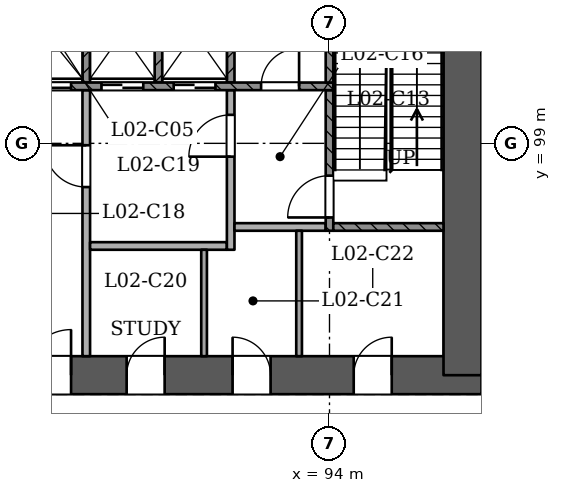
"""IFC4 building model, lengths in metres.
Left out: names, types, materials, properties, quantities, classifications, styles, units other than length and angle.
Written with IfcOpenShell. Run it as: python <this file> out.ifc"""

import sys

from ifc_helpers import new_model, si_unit, direction, frame, frame_2d, origin, place, context, subcontext, project, spatial, rectangle, extrude, element, fill, save


model = new_model("IFC4")
c1 = context("Model", 3, precision=1e-05, world=origin(), true_north=direction((0.0, 1.0)))
c2 = subcontext(c1, "Body", "Model", "MODEL_VIEW")
j1 = project(units=[si_unit("LENGTHUNIT", "METRE"), si_unit("PLANEANGLEUNIT", "RADIAN")], contexts=[c1])
p1 = place(None, origin())
s1 = spatial("IfcSite", under=j1, at=p1, CompositionType="ELEMENT")
p2 = place(p1, origin())
s2 = spatial("IfcBuilding", under=s1, at=p2, CompositionType="ELEMENT")
p3 = place(p2, frame((0.0, 0.0, 13.5)))
s3 = spatial("IfcBuildingStorey", under=s2, at=p3, CompositionType="ELEMENT", Elevation=13.5)
p4 = place(p3, frame((72.5, 92.9, 0.0), z_axis=(0.0, 0.0, 1.0), x_axis=(1.0, 0.0, 0.0)))
e1 = element("IfcWall", 1, at=p4, inside=s3, PredefinedType="SHEAR", context=c2, shape_type="SweptSolid", body=[
    extrude(rectangle(XDim=25.5, YDim=1.0, at=frame_2d((12.75, 0.0))), origin(), (0.0, 0.0, 1.0), 4.5),
])
p5 = place(p4, frame((1.3, 0.0, 0.0)))
e2 = element("IfcOpeningElement", 2, at=p5, cuts=e1, PredefinedType="OPENING", context=c2, shape_type="SweptSolid", body=[
    extrude(rectangle(XDim=1.2, YDim=2.1, at=frame_2d((0.6, 1.05))), frame((0.0, 0.51, 0.0), z_axis=(0.0, -1.0, 0.0), x_axis=(1.0, 0.0, 0.0)), (0.0, 0.0, 1.0), 1.021),
])
p6 = place(p4, frame((3.5, 0.0, 0.0)))
e3 = element("IfcOpeningElement", 3, at=p6, cuts=e1, PredefinedType="OPENING", context=c2, shape_type="SweptSolid", body=[
    extrude(rectangle(XDim=1.2, YDim=2.1, at=frame_2d((0.6, 1.05))), frame((0.0, 0.51, 0.0), z_axis=(0.0, -1.0, 0.0), x_axis=(1.0, 0.0, 0.0)), (0.0, 0.0, 1.0), 1.021),
])
p7 = place(p4, frame((13.5, 0.0, 0.0)))
e4 = element("IfcOpeningElement", 4, at=p7, cuts=e1, PredefinedType="OPENING", context=c2, shape_type="SweptSolid", body=[
    extrude(rectangle(XDim=1.2, YDim=2.1, at=frame_2d((0.6, 1.05))), frame((0.0, 0.51, 0.0), z_axis=(0.0, -1.0, 0.0), x_axis=(1.0, 0.0, 0.0)), (0.0, 0.0, 1.0), 1.021),
])
p8 = place(p4, frame((16.163, 0.0, 0.0)))
e5 = element("IfcOpeningElement", 5, at=p8, cuts=e1, PredefinedType="OPENING", context=c2, shape_type="SweptSolid", body=[
    extrude(rectangle(XDim=1.0, YDim=2.1, at=frame_2d((0.5, 1.05))), frame((0.0, 0.51, 0.0), z_axis=(0.0, -1.0, 0.0), x_axis=(1.0, 0.0, 0.0)), (0.0, 0.0, 1.0), 1.021),
])
p9 = place(p4, frame((18.95, 0.0, 0.0)))
e6 = element("IfcOpeningElement", 6, at=p9, cuts=e1, PredefinedType="OPENING", context=c2, shape_type="SweptSolid", body=[
    extrude(rectangle(XDim=1.0, YDim=2.1, at=frame_2d((0.5, 1.05))), frame((0.0, 0.51, 0.0), z_axis=(0.0, -1.0, 0.0), x_axis=(1.0, 0.0, 0.0)), (0.0, 0.0, 1.0), 1.021),
])
p10 = place(p4, frame((22.137, 0.0, 0.0)))
e7 = element("IfcOpeningElement", 7, at=p10, cuts=e1, PredefinedType="OPENING", context=c2, shape_type="SweptSolid", body=[
    extrude(rectangle(XDim=1.0, YDim=2.1, at=frame_2d((0.5, 1.05))), frame((0.0, 0.51, 0.0), z_axis=(0.0, -1.0, 0.0), x_axis=(1.0, 0.0, 0.0)), (0.0, 0.0, 1.0), 1.021),
])
p11 = place(p3, frame((97.5, 92.9, 0.0), z_axis=(0.0, 0.0, 1.0), x_axis=(0.0, 1.0, 0.0)))
e8 = element("IfcWall", 8, at=p11, inside=s3, PredefinedType="SHEAR", context=c2, shape_type="SweptSolid", body=[
    extrude(rectangle(XDim=11.5, YDim=1.0, at=frame_2d((5.75, 0.0))), origin(), (0.0, 0.0, 1.0), 4.5),
])
p12 = place(p3, frame((86.747, 47.526, 0.0), z_axis=(0.0, 0.0, 1.0), x_axis=(0.500000085768, 0.866025354266, 0.0)))
e9 = element("IfcWall", 9, at=p12, inside=s3, PredefinedType="PARTITIONING", context=c2, shape_type="SweptSolid", body=[
    extrude(rectangle(XDim=55.365, YDim=0.15, at=frame_2d((27.682, 0.0))), origin(), (0.0, 0.0, 1.0), 4.05),
])
p13 = place(p12, frame((0.97, 0.0, 0.0)))
e10 = element("IfcOpeningElement", 10, at=p13, cuts=e9, PredefinedType="OPENING", context=c2, shape_type="SweptSolid", body=[
    extrude(rectangle(XDim=1.2, YDim=2.1, at=frame_2d((0.6, 1.05))), frame((0.0, 0.085, 0.0), z_axis=(0.0, -1.0, 0.0), x_axis=(1.0, 0.0, 0.0)), (0.0, 0.0, 1.0), 0.171),
])
p14 = place(p12, frame((11.332, 0.0, 0.0)))
e11 = element("IfcOpeningElement", 11, at=p14, cuts=e9, PredefinedType="OPENING", context=c2, shape_type="SweptSolid", body=[
    extrude(rectangle(XDim=1.2, YDim=2.1, at=frame_2d((0.6, 1.05))), frame((0.0, 0.085, 0.0), z_axis=(0.0, -1.0, 0.0), x_axis=(1.0, 0.0, 0.0)), (0.0, 0.0, 1.0), 0.171),
])
p15 = place(p12, frame((29.332, 0.0, 0.0)))
e12 = element("IfcOpeningElement", 12, at=p15, cuts=e9, PredefinedType="OPENING", context=c2, shape_type="SweptSolid", body=[
    extrude(rectangle(XDim=1.2, YDim=2.1, at=frame_2d((0.6, 1.05))), frame((0.0, 0.085, 0.0), z_axis=(0.0, -1.0, 0.0), x_axis=(1.0, 0.0, 0.0)), (0.0, 0.0, 1.0), 0.171),
])
p16 = place(p12, frame((42.132, 0.0, 0.0)))
e13 = element("IfcOpeningElement", 13, at=p16, cuts=e9, PredefinedType="OPENING", context=c2, shape_type="SweptSolid", body=[
    extrude(rectangle(XDim=1.2, YDim=2.1, at=frame_2d((0.6, 1.05))), frame((0.0, 0.085, 0.0), z_axis=(0.0, -1.0, 0.0), x_axis=(1.0, 0.0, 0.0)), (0.0, 0.0, 1.0), 0.171),
])
p17 = place(p12, frame((46.569, 0.0, 0.0)))
e14 = element("IfcOpeningElement", 14, at=p17, cuts=e9, PredefinedType="OPENING", context=c2, shape_type="SweptSolid", body=[
    extrude(rectangle(XDim=1.0, YDim=2.1, at=frame_2d((0.5, 1.05))), frame((0.0, 0.085, 0.0), z_axis=(0.0, -1.0, 0.0), x_axis=(1.0, 0.0, 0.0)), (0.0, 0.0, 1.0), 0.171),
])
p18 = place(p12, frame((48.819, 0.0, 0.0)))
e15 = element("IfcOpeningElement", 15, at=p18, cuts=e9, PredefinedType="OPENING", context=c2, shape_type="SweptSolid", body=[
    extrude(rectangle(XDim=1.0, YDim=2.1, at=frame_2d((0.5, 1.05))), frame((0.0, 0.085, 0.0), z_axis=(0.0, -1.0, 0.0), x_axis=(1.0, 0.0, 0.0)), (0.0, 0.0, 1.0), 0.171),
])
p19 = place(p12, frame((51.837, 0.0, 0.0)))
e16 = element("IfcOpeningElement", 16, at=p19, cuts=e9, PredefinedType="OPENING", context=c2, shape_type="SweptSolid", body=[
    extrude(rectangle(XDim=1.2, YDim=2.1, at=frame_2d((0.6, 1.05))), frame((0.0, 0.085, 0.0), z_axis=(0.0, -1.0, 0.0), x_axis=(1.0, 0.0, 0.0)), (0.0, 0.0, 1.0), 0.171),
])
p20 = place(p3, frame((121.762, 95.574, 0.0), z_axis=(0.0, 0.0, 1.0), x_axis=(-0.499997306052, -0.866026959131, 0.0)))
e17 = element("IfcWall", 17, at=p20, inside=s3, PredefinedType="SOLIDWALL", context=c2, shape_type="SweptSolid", body=[
    extrude(rectangle(XDim=62.87, YDim=0.4, at=frame_2d((31.435, 0.0))), origin(), (0.0, 0.0, 1.0), 4.05),
])
p21 = place(p20, frame((59.452, 0.0, 0.9)))
e18 = element("IfcOpeningElement", 18, at=p21, cuts=e17, PredefinedType="OPENING", context=c2, shape_type="SweptSolid", body=[
    extrude(rectangle(XDim=2.4, YDim=1.5, at=frame_2d((1.2, 0.75))), frame((0.0, 0.21, 0.0), z_axis=(0.0, -1.0, 0.0), x_axis=(1.0, 0.0, 0.0)), (0.0, 0.0, 1.0), 0.421),
])
p22 = place(p20, frame((54.986, 0.0, 0.9)))
e19 = element("IfcOpeningElement", 19, at=p22, cuts=e17, PredefinedType="OPENING", context=c2, shape_type="SweptSolid", body=[
    extrude(rectangle(XDim=2.4, YDim=1.5, at=frame_2d((1.2, 0.75))), frame((0.0, 0.21, 0.0), z_axis=(0.0, -1.0, 0.0), x_axis=(1.0, 0.0, 0.0)), (0.0, 0.0, 1.0), 0.421),
])
p23 = place(p20, frame((50.486, 0.0, 0.9)))
e20 = element("IfcOpeningElement", 20, at=p23, cuts=e17, PredefinedType="OPENING", context=c2, shape_type="SweptSolid", body=[
    extrude(rectangle(XDim=2.4, YDim=1.5, at=frame_2d((1.2, 0.75))), frame((0.0, 0.21, 0.0), z_axis=(0.0, -1.0, 0.0), x_axis=(1.0, 0.0, 0.0)), (0.0, 0.0, 1.0), 0.421),
])
p24 = place(p20, frame((45.986, 0.0, 0.9)))
e21 = element("IfcOpeningElement", 21, at=p24, cuts=e17, PredefinedType="OPENING", context=c2, shape_type="SweptSolid", body=[
    extrude(rectangle(XDim=2.4, YDim=1.5, at=frame_2d((1.2, 0.75))), frame((0.0, 0.21, 0.0), z_axis=(0.0, -1.0, 0.0), x_axis=(1.0, 0.0, 0.0)), (0.0, 0.0, 1.0), 0.421),
])
p25 = place(p20, frame((41.486, 0.0, 0.9)))
e22 = element("IfcOpeningElement", 22, at=p25, cuts=e17, PredefinedType="OPENING", context=c2, shape_type="SweptSolid", body=[
    extrude(rectangle(XDim=2.4, YDim=1.5, at=frame_2d((1.2, 0.75))), frame((0.0, 0.21, 0.0), z_axis=(0.0, -1.0, 0.0), x_axis=(1.0, 0.0, 0.0)), (0.0, 0.0, 1.0), 0.421),
])
p26 = place(p20, frame((36.986, 0.0, 0.9)))
e23 = element("IfcOpeningElement", 23, at=p26, cuts=e17, PredefinedType="OPENING", context=c2, shape_type="SweptSolid", body=[
    extrude(rectangle(XDim=2.4, YDim=1.5, at=frame_2d((1.2, 0.75))), frame((0.0, 0.21, 0.0), z_axis=(0.0, -1.0, 0.0), x_axis=(1.0, 0.0, 0.0)), (0.0, 0.0, 1.0), 0.421),
])
p27 = place(p20, frame((23.486, 0.0, 0.9)))
e24 = element("IfcOpeningElement", 24, at=p27, cuts=e17, PredefinedType="OPENING", context=c2, shape_type="SweptSolid", body=[
    extrude(rectangle(XDim=2.4, YDim=1.5, at=frame_2d((1.2, 0.75))), frame((0.0, 0.21, 0.0), z_axis=(0.0, -1.0, 0.0), x_axis=(1.0, 0.0, 0.0)), (0.0, 0.0, 1.0), 0.421),
])
p28 = place(p20, frame((18.986, 0.0, 0.9)))
e25 = element("IfcOpeningElement", 25, at=p28, cuts=e17, PredefinedType="OPENING", context=c2, shape_type="SweptSolid", body=[
    extrude(rectangle(XDim=2.4, YDim=1.5, at=frame_2d((1.2, 0.75))), frame((0.0, 0.21, 0.0), z_axis=(0.0, -1.0, 0.0), x_axis=(1.0, 0.0, 0.0)), (0.0, 0.0, 1.0), 0.421),
])
p29 = place(p20, frame((14.486, 0.0, 0.9)))
e26 = element("IfcOpeningElement", 26, at=p29, cuts=e17, PredefinedType="OPENING", context=c2, shape_type="SweptSolid", body=[
    extrude(rectangle(XDim=2.4, YDim=1.5, at=frame_2d((1.2, 0.75))), frame((0.0, 0.21, 0.0), z_axis=(0.0, -1.0, 0.0), x_axis=(1.0, 0.0, 0.0)), (0.0, 0.0, 1.0), 0.421),
])
p30 = place(p20, frame((5.486, 0.0, 0.9)))
e27 = element("IfcOpeningElement", 27, at=p30, cuts=e17, PredefinedType="OPENING", context=c2, shape_type="SweptSolid", body=[
    extrude(rectangle(XDim=2.4, YDim=1.5, at=frame_2d((1.2, 0.75))), frame((0.0, 0.21, 0.0), z_axis=(0.0, -1.0, 0.0), x_axis=(1.0, 0.0, 0.0)), (0.0, 0.0, 1.0), 0.421),
])
p31 = place(p20, frame((1.018, 0.0, 0.9)))
e28 = element("IfcOpeningElement", 28, at=p31, cuts=e17, PredefinedType="OPENING", context=c2, shape_type="SweptSolid", body=[
    extrude(rectangle(XDim=2.4, YDim=1.5, at=frame_2d((1.2, 0.75))), frame((0.0, 0.21, 0.0), z_axis=(0.0, -1.0, 0.0), x_axis=(1.0, 0.0, 0.0)), (0.0, 0.0, 1.0), 0.421),
])
p32 = place(p3, frame((87.6, 93.4, 0.0), z_axis=(0.0, 0.0, 1.0), x_axis=(0.0, 1.0, 0.0)))
e29 = element("IfcWall", 29, at=p32, inside=s3, PredefinedType="PARTITIONING", context=c2, shape_type="SweptSolid", body=[
    extrude(rectangle(XDim=7.0, YDim=0.2, at=frame_2d((3.5, 0.0))), origin(), (0.0, 0.0, 1.0), 4.05),
])
p33 = place(p32, frame((4.45, 0.0, 0.0)))
e30 = element("IfcOpeningElement", 30, at=p33, cuts=e29, PredefinedType="OPENING", context=c2, shape_type="SweptSolid", body=[
    extrude(rectangle(XDim=1.1, YDim=2.1, at=frame_2d((0.55, 1.05))), frame((0.0, 0.11, 0.0), z_axis=(0.0, -1.0, 0.0), x_axis=(1.0, 0.0, 0.0)), (0.0, 0.0, 1.0), 0.221),
])
p34 = place(p3, frame((90.7, 93.4, 0.0), z_axis=(0.0, 0.0, 1.0), x_axis=(0.0, 1.0, 0.0)))
e31 = element("IfcWall", 31, at=p34, inside=s3, PredefinedType="PARTITIONING", context=c2, shape_type="SweptSolid", body=[
    extrude(rectangle(XDim=2.8, YDim=0.15, at=frame_2d((1.4, 0.0))), origin(), (0.0, 0.0, 1.0), 4.05),
])
p35 = place(p3, frame((93.2, 93.4, 0.0), z_axis=(0.0, 0.0, 1.0), x_axis=(0.0, 1.0, 0.0)))
e32 = element("IfcWall", 32, at=p35, inside=s3, PredefinedType="PARTITIONING", context=c2, shape_type="SweptSolid", body=[
    extrude(rectangle(XDim=3.3, YDim=0.15, at=frame_2d((1.65, 0.0))), origin(), (0.0, 0.0, 1.0), 4.05),
])
p36 = place(p3, frame((87.7, 96.3, 0.0), z_axis=(0.0, 0.0, 1.0), x_axis=(1.0, 0.0, 0.0)))
e33 = element("IfcWall", 33, at=p36, inside=s3, PredefinedType="PARTITIONING", context=c2, shape_type="SweptSolid", body=[
    extrude(rectangle(XDim=3.6, YDim=0.2, at=frame_2d((1.8, 0.0))), origin(), (0.0, 0.0, 1.0), 4.05),
])
p37 = place(p3, frame((91.4, 96.2, 0.0), z_axis=(0.0, 0.0, 1.0), x_axis=(0.0, 1.0, 0.0)))
e34 = element("IfcWall", 34, at=p37, inside=s3, PredefinedType="PARTITIONING", context=c2, shape_type="SweptSolid", body=[
    extrude(rectangle(XDim=4.2, YDim=0.2, at=frame_2d((2.1, 0.0))), origin(), (0.0, 0.0, 1.0), 4.05),
])
p38 = place(p37, frame((2.45, 0.0, 0.0)))
e35 = element("IfcOpeningElement", 35, at=p38, cuts=e34, PredefinedType="OPENING", context=c2, shape_type="SweptSolid", body=[
    extrude(rectangle(XDim=1.1, YDim=2.1, at=frame_2d((0.55, 1.05))), frame((0.0, 0.11, 0.0), z_axis=(0.0, -1.0, 0.0), x_axis=(1.0, 0.0, 0.0)), (0.0, 0.0, 1.0), 0.221),
])
p39 = place(p3, frame((91.5, 96.8, 0.0), z_axis=(0.0, 0.0, 1.0), x_axis=(1.0, 0.0, 0.0)))
e36 = element("IfcWall", 36, at=p39, inside=s3, PredefinedType="PARTITIONING", context=c2, shape_type="SweptSolid", body=[
    extrude(rectangle(XDim=2.4, YDim=0.2, at=frame_2d((1.2, 0.0))), origin(), (0.0, 0.0, 1.0), 4.05),
])
p40 = place(p3, frame((94.0, 96.7, 0.0), z_axis=(0.0, 0.0, 1.0), x_axis=(0.0, 1.0, 0.0)))
e37 = element("IfcWall", 37, at=p40, inside=s3, PredefinedType="SOLIDWALL", context=c2, shape_type="SweptSolid", body=[
    extrude(rectangle(XDim=3.7, YDim=0.2, at=frame_2d((1.85, 0.0))), origin(), (0.0, 0.0, 1.0), 4.05),
])
p41 = place(p40, frame((0.35, 0.0, 0.0)))
e38 = element("IfcOpeningElement", 38, at=p41, cuts=e37, PredefinedType="OPENING", context=c2, shape_type="SweptSolid", body=[
    extrude(rectangle(XDim=1.1, YDim=2.1, at=frame_2d((0.55, 1.05))), frame((0.0, 0.11, 0.0), z_axis=(0.0, -1.0, 0.0), x_axis=(1.0, 0.0, 0.0)), (0.0, 0.0, 1.0), 0.221),
])
p42 = place(p3, frame((94.1, 96.8, 0.0), z_axis=(0.0, 0.0, 1.0), x_axis=(1.0, 0.0, 0.0)))
e39 = element("IfcWall", 39, at=p42, inside=s3, PredefinedType="SOLIDWALL", context=c2, shape_type="SweptSolid", body=[
    extrude(rectangle(XDim=2.9, YDim=0.2, at=frame_2d((1.45, 0.0))), origin(), (0.0, 0.0, 1.0), 4.05),
])
p43 = place(p3, frame((75.9, 100.5, 0.0), z_axis=(0.0, 0.0, 1.0), x_axis=(1.0, 0.0, 0.0)))
e40 = element("IfcWall", 40, at=p43, inside=s3, PredefinedType="SOLIDWALL", context=c2, shape_type="SweptSolid", body=[
    extrude(rectangle(XDim=18.2, YDim=0.2, at=frame_2d((9.1, 0.0))), origin(), (0.0, 0.0, 1.0), 4.05),
])
p44 = place(p43, frame((2.6, 0.0, 0.0)))
e41 = element("IfcOpeningElement", 41, at=p44, cuts=e40, PredefinedType="OPENING", context=c2, shape_type="SweptSolid", body=[
    extrude(rectangle(XDim=1.1, YDim=2.1, at=frame_2d((0.55, 1.05))), frame((0.0, 0.11, 0.0), z_axis=(0.0, -1.0, 0.0), x_axis=(1.0, 0.0, 0.0)), (0.0, 0.0, 1.0), 0.221),
])
p45 = place(p43, frame((4.5, 0.0, 0.0)))
e42 = element("IfcOpeningElement", 42, at=p45, cuts=e40, PredefinedType="OPENING", context=c2, shape_type="SweptSolid", body=[
    extrude(rectangle(XDim=1.1, YDim=2.1, at=frame_2d((0.55, 1.05))), frame((0.0, 0.11, 0.0), z_axis=(0.0, -1.0, 0.0), x_axis=(1.0, 0.0, 0.0)), (0.0, 0.0, 1.0), 0.221),
])
p46 = place(p43, frame((6.4, 0.0, 0.0)))
e43 = element("IfcOpeningElement", 43, at=p46, cuts=e40, PredefinedType="OPENING", context=c2, shape_type="SweptSolid", body=[
    extrude(rectangle(XDim=1.1, YDim=2.1, at=frame_2d((0.55, 1.05))), frame((0.0, 0.11, 0.0), z_axis=(0.0, -1.0, 0.0), x_axis=(1.0, 0.0, 0.0)), (0.0, 0.0, 1.0), 0.221),
])
p47 = place(p43, frame((8.3, 0.0, 0.0)))
e44 = element("IfcOpeningElement", 44, at=p47, cuts=e40, PredefinedType="OPENING", context=c2, shape_type="SweptSolid", body=[
    extrude(rectangle(XDim=1.1, YDim=2.1, at=frame_2d((0.55, 1.05))), frame((0.0, 0.11, 0.0), z_axis=(0.0, -1.0, 0.0), x_axis=(1.0, 0.0, 0.0)), (0.0, 0.0, 1.0), 0.221),
])
p48 = place(p43, frame((10.2, 0.0, 0.0)))
e45 = element("IfcOpeningElement", 45, at=p48, cuts=e40, PredefinedType="OPENING", context=c2, shape_type="SweptSolid", body=[
    extrude(rectangle(XDim=1.1, YDim=2.1, at=frame_2d((0.55, 1.05))), frame((0.0, 0.11, 0.0), z_axis=(0.0, -1.0, 0.0), x_axis=(1.0, 0.0, 0.0)), (0.0, 0.0, 1.0), 0.221),
])
p49 = place(p43, frame((12.1, 0.0, 0.0)))
e46 = element("IfcOpeningElement", 46, at=p49, cuts=e40, PredefinedType="OPENING", context=c2, shape_type="SweptSolid", body=[
    extrude(rectangle(XDim=1.1, YDim=2.1, at=frame_2d((0.55, 1.05))), frame((0.0, 0.11, 0.0), z_axis=(0.0, -1.0, 0.0), x_axis=(1.0, 0.0, 0.0)), (0.0, 0.0, 1.0), 0.221),
])
p50 = place(p43, frame((14.0, 0.0, 0.0)))
e47 = element("IfcOpeningElement", 47, at=p50, cuts=e40, PredefinedType="OPENING", context=c2, shape_type="SweptSolid", body=[
    extrude(rectangle(XDim=1.1, YDim=2.1, at=frame_2d((0.55, 1.05))), frame((0.0, 0.11, 0.0), z_axis=(0.0, -1.0, 0.0), x_axis=(1.0, 0.0, 0.0)), (0.0, 0.0, 1.0), 0.221),
])
p51 = place(p43, frame((0.65, 0.0, 0.0)))
e48 = element("IfcOpeningElement", 48, at=p51, cuts=e40, PredefinedType="OPENING", context=c2, shape_type="SweptSolid", body=[
    extrude(rectangle(XDim=1.0, YDim=2.1, at=frame_2d((0.5, 1.05))), frame((0.0, 0.11, 0.0), z_axis=(0.0, -1.0, 0.0), x_axis=(1.0, 0.0, 0.0)), (0.0, 0.0, 1.0), 0.221),
])
p52 = place(p43, frame((16.3, 0.0, 0.0)))
e49 = element("IfcOpeningElement", 49, at=p52, cuts=e40, PredefinedType="OPENING", context=c2, shape_type="SweptSolid", body=[
    extrude(rectangle(XDim=1.0, YDim=2.1, at=frame_2d((0.5, 1.05))), frame((0.0, 0.11, 0.0), z_axis=(0.0, -1.0, 0.0), x_axis=(1.0, 0.0, 0.0)), (0.0, 0.0, 1.0), 0.221),
])
for number, where, z_axis, x_axis in (
    (50, (87.6, 100.6, 0.0), (0.0, 0.0, 1.0), (0.0, 1.0, 0.0)),
    (51, (89.5, 100.6, 0.0), (0.0, 0.0, 1.0), (0.0, 1.0, 0.0)),
    (52, (91.4, 100.6, 0.0), (0.0, 0.0, 1.0), (0.0, 1.0, 0.0)),
    (53, (94.0, 100.6, 0.0), (0.0, 0.0, 1.0), (0.0, 1.0, 0.0)),
):
    element("IfcWall", number, at=place(p3, frame(where, z_axis=z_axis, x_axis=x_axis)), inside=s3, PredefinedType="SOLIDWALL", context=c2, shape_type="SweptSolid", body=[
        extrude(rectangle(XDim=2.8, YDim=0.2, at=frame_2d((1.4, 0.0))), origin(), (0.0, 0.0, 1.0), 4.05),
    ])
p53 = place(p48, origin())
e54 = element("IfcDoor", 54, at=p53, inside=s3, OperationType="SLIDING_TO_RIGHT", PredefinedType="NOTDEFINED", context=c2, shape_type="SweptSolid", body=[
    extrude(rectangle(XDim=1.1, YDim=2.1, at=frame_2d((0.55, 1.05))), frame((0.0, 0.025, 0.0), z_axis=(0.0, -1.0, 0.0), x_axis=(1.0, 0.0, 0.0)), (0.0, 0.0, 1.0), 0.05),
])
fill(e45, e54)
p54 = place(p49, origin())
e55 = element("IfcDoor", 55, at=p54, inside=s3, OperationType="SLIDING_TO_RIGHT", PredefinedType="NOTDEFINED", context=c2, shape_type="SweptSolid", body=[
    extrude(rectangle(XDim=1.1, YDim=2.1, at=frame_2d((0.55, 1.05))), frame((0.0, 0.025, 0.0), z_axis=(0.0, -1.0, 0.0), x_axis=(1.0, 0.0, 0.0)), (0.0, 0.0, 1.0), 0.05),
])
fill(e46, e55)
p55 = place(p50, origin())
e56 = element("IfcDoor", 56, at=p55, inside=s3, OperationType="SLIDING_TO_LEFT", PredefinedType="NOTDEFINED", context=c2, shape_type="SweptSolid", body=[
    extrude(rectangle(XDim=1.1, YDim=2.1, at=frame_2d((0.55, 1.05))), frame((0.0, 0.025, 0.0), z_axis=(0.0, -1.0, 0.0), x_axis=(1.0, 0.0, 0.0)), (0.0, 0.0, 1.0), 0.05),
])
fill(e47, e56)
p56 = place(p41, origin())
e57 = element("IfcDoor", 57, at=p56, inside=s3, OperationType="SINGLE_SWING_LEFT", PredefinedType="NOTDEFINED", context=c2, shape_type="SweptSolid", body=[
    extrude(rectangle(XDim=1.1, YDim=2.1, at=frame_2d((0.55, 1.05))), frame((0.0, 0.025, 0.0), z_axis=(0.0, -1.0, 0.0), x_axis=(1.0, 0.0, 0.0)), (0.0, 0.0, 1.0), 0.05),
])
fill(e38, e57)
p57 = place(p33, origin())
e58 = element("IfcDoor", 58, at=p57, inside=s3, OperationType="SINGLE_SWING_RIGHT", PredefinedType="NOTDEFINED", context=c2, shape_type="SweptSolid", body=[
    extrude(rectangle(XDim=1.1, YDim=2.1, at=frame_2d((0.55, 1.05))), frame((0.0, 0.025, 0.0), z_axis=(0.0, -1.0, 0.0), x_axis=(1.0, 0.0, 0.0)), (0.0, 0.0, 1.0), 0.05),
])
fill(e30, e58)
p58 = place(p38, origin())
e59 = element("IfcDoor", 59, at=p58, inside=s3, OperationType="SINGLE_SWING_LEFT", PredefinedType="NOTDEFINED", context=c2, shape_type="SweptSolid", body=[
    extrude(rectangle(XDim=1.1, YDim=2.1, at=frame_2d((0.55, 1.05))), frame((0.0, 0.025, 0.0), z_axis=(0.0, -1.0, 0.0), x_axis=(1.0, 0.0, 0.0)), (0.0, 0.0, 1.0), 0.05),
])
fill(e35, e59)
p59 = place(p7, origin())
e60 = element("IfcDoor", 60, at=p59, inside=s3, OperationType="SINGLE_SWING_RIGHT", PredefinedType="NOTDEFINED", context=c2, shape_type="SweptSolid", body=[
    extrude(rectangle(XDim=1.2, YDim=2.1, at=frame_2d((0.6, 1.05))), frame((0.0, 0.025, 0.0), z_axis=(0.0, -1.0, 0.0), x_axis=(1.0, 0.0, 0.0)), (0.0, 0.0, 1.0), 0.05),
])
fill(e4, e60)
p60 = place(p52, origin())
e61 = element("IfcDoor", 61, at=p60, inside=s3, OperationType="SINGLE_SWING_RIGHT", PredefinedType="NOTDEFINED", context=c2, shape_type="SweptSolid", body=[
    extrude(rectangle(XDim=1.0, YDim=2.1, at=frame_2d((0.5, 1.05))), frame((0.0, 0.025, 0.0), z_axis=(0.0, -1.0, 0.0), x_axis=(1.0, 0.0, 0.0)), (0.0, 0.0, 1.0), 0.05),
])
fill(e49, e61)
p61 = place(p8, origin())
e62 = element("IfcDoor", 62, at=p61, inside=s3, OperationType="SINGLE_SWING_RIGHT", PredefinedType="NOTDEFINED", context=c2, shape_type="SweptSolid", body=[
    extrude(rectangle(XDim=1.0, YDim=2.1, at=frame_2d((0.5, 1.05))), frame((0.0, 0.025, 0.0), z_axis=(0.0, -1.0, 0.0), x_axis=(1.0, 0.0, 0.0)), (0.0, 0.0, 1.0), 0.05),
])
fill(e5, e62)
p62 = place(p9, origin())
e63 = element("IfcDoor", 63, at=p62, inside=s3, OperationType="SINGLE_SWING_LEFT", PredefinedType="NOTDEFINED", context=c2, shape_type="SweptSolid", body=[
    extrude(rectangle(XDim=1.0, YDim=2.1, at=frame_2d((0.5, 1.05))), frame((0.0, 0.025, 0.0), z_axis=(0.0, -1.0, 0.0), x_axis=(1.0, 0.0, 0.0)), (0.0, 0.0, 1.0), 0.05),
])
fill(e6, e63)
p63 = place(p10, origin())
e64 = element("IfcDoor", 64, at=p63, inside=s3, OperationType="SINGLE_SWING_RIGHT", PredefinedType="NOTDEFINED", context=c2, shape_type="SweptSolid", body=[
    extrude(rectangle(XDim=1.0, YDim=2.1, at=frame_2d((0.5, 1.05))), frame((0.0, 0.025, 0.0), z_axis=(0.0, -1.0, 0.0), x_axis=(1.0, 0.0, 0.0)), (0.0, 0.0, 1.0), 0.05),
])
fill(e7, e64)
save(model, sys.argv[1])
